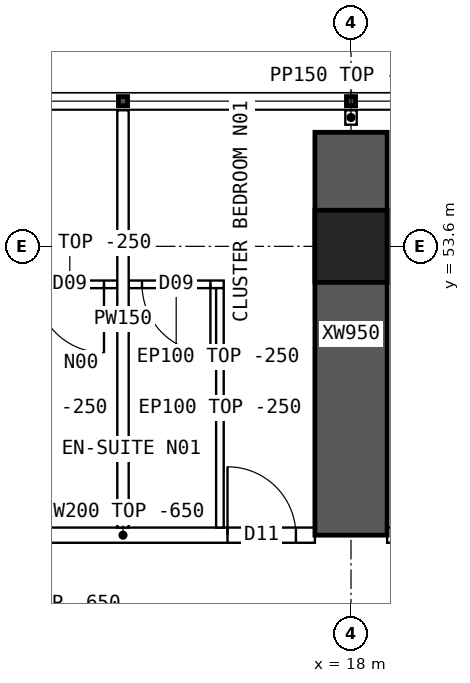
"""IFC4 building model, lengths in metres.
Left out: names, types, materials, properties, quantities, classifications, styles, units other than length and angle.
Written with IfcOpenShell. Run it as: python <this file> out.ifc"""

import sys

from ifc_helpers import new_model, si_unit, direction, frame, frame_2d, origin, origin_2d, place, context, subcontext, project, spatial, polyline, rectangle, hollow_rectangle, outline, extrude, element, fill, save


model = new_model("IFC4")
c1 = context("Model", 3, precision=1e-05, world=origin(), true_north=direction((0.0, 1.0)))
c2 = subcontext(c1, "Body", "Model", "MODEL_VIEW")
j1 = project(units=[si_unit("LENGTHUNIT", "METRE"), si_unit("PLANEANGLEUNIT", "RADIAN")], contexts=[c1])
p1 = place(None, origin())
s1 = spatial("IfcSite", under=j1, at=p1, CompositionType="ELEMENT")
p2 = place(p1, origin())
s2 = spatial("IfcBuilding", under=s1, at=p2, CompositionType="ELEMENT")
p3 = place(p2, frame((0.0, 0.0, 118.15)))
s3 = spatial("IfcBuildingStorey", under=s2, at=p3, CompositionType="ELEMENT", Elevation=118.15)
p4 = place(p3, frame((18.0, 53.6, 0.0), z_axis=(0.0, 0.0, 1.0), x_axis=(1.0, 0.0, 0.0)))
e1 = element("IfcColumn", 1, at=p4, inside=s3, PredefinedType="COLUMN", context=c2, shape_type="SweptSolid", body=[
    extrude(hollow_rectangle(XDim=0.95, YDim=0.95, WallThickness=0.095, at=origin_2d()), origin(), (0.0, 0.0, 1.0), 3.75),
])
p5 = place(p3, frame((18.0, 49.8, 0.0), z_axis=(0.0, 0.0, 1.0), x_axis=(0.0, 1.0, 0.0)))
e2 = element("IfcWall", 2, at=p5, inside=s3, PredefinedType="SHEAR", context=c2, shape_type="SweptSolid", body=[
    extrude(rectangle(XDim=5.3, YDim=0.95, at=frame_2d((2.65, 0.0))), origin(), (0.0, 0.0, 1.0), 3.75),
])
p6 = place(p3, frame((12.475, 49.8, 0.0), z_axis=(0.0, 0.0, 1.0), x_axis=(1.0, 0.0, 0.0)))
e3 = element("IfcWall", 3, at=p6, inside=s3, PredefinedType="SOLIDWALL", context=c2, shape_type="SweptSolid", body=[
    extrude(outline(polyline([(0.0, 0.0), (5.05, 0.0), (5.05, 3.1), (0.0, 3.1), (0.0, 0.0)])), frame((0.0, 0.1, 0.0), z_axis=(0.0, -1.0, 0.0), x_axis=(1.0, 0.0, 0.0)), (0.0, 0.0, 1.0), 0.2),
])
p7 = place(p6, frame((0.1, 0.0, 0.0)))
e4 = element("IfcOpeningElement", 4, at=p7, cuts=e3, PredefinedType="OPENING", context=c2, shape_type="SweptSolid", body=[
    extrude(rectangle(XDim=0.9, YDim=2.1, at=frame_2d((0.45, 1.05))), frame((0.0, 0.11, 0.0), z_axis=(0.0, -1.0, 0.0), x_axis=(1.0, 0.0, 0.0)), (0.0, 0.0, 1.0), 0.22),
])
p8 = place(p6, frame((3.9, 0.0, 0.0)))
e5 = element("IfcOpeningElement", 5, at=p8, cuts=e3, PredefinedType="OPENING", context=c2, shape_type="SweptSolid", body=[
    extrude(rectangle(XDim=0.9, YDim=2.1, at=frame_2d((0.45, 1.05))), frame((0.0, 0.11, 0.0), z_axis=(0.0, -1.0, 0.0), x_axis=(1.0, 0.0, 0.0)), (0.0, 0.0, 1.0), 0.22),
])
p9 = place(p3, frame((18.475, 49.8, 0.0), z_axis=(0.0, 0.0, 1.0), x_axis=(1.0, 0.0, 0.0)))
e6 = element("IfcWall", 6, at=p9, inside=s3, PredefinedType="SOLIDWALL", context=c2, shape_type="SweptSolid", body=[
    extrude(outline(polyline([(0.0, 0.0), (5.05, 0.0), (5.05, 3.1), (0.0, 3.1), (0.0, 0.0)])), frame((0.0, 0.1, 0.0), z_axis=(0.0, -1.0, 0.0), x_axis=(1.0, 0.0, 0.0)), (0.0, 0.0, 1.0), 0.2),
])
p10 = place(p9, frame((0.1, 0.0, 0.0)))
e7 = element("IfcOpeningElement", 7, at=p10, cuts=e6, PredefinedType="OPENING", context=c2, shape_type="SweptSolid", body=[
    extrude(rectangle(XDim=0.9, YDim=2.1, at=frame_2d((0.45, 1.05))), frame((0.0, 0.11, 0.0), z_axis=(0.0, -1.0, 0.0), x_axis=(1.0, 0.0, 0.0)), (0.0, 0.0, 1.0), 0.22),
])
p11 = place(p9, frame((3.9, 0.0, 0.0)))
e8 = element("IfcOpeningElement", 8, at=p11, cuts=e6, PredefinedType="OPENING", context=c2, shape_type="SweptSolid", body=[
    extrude(rectangle(XDim=0.9, YDim=2.1, at=frame_2d((0.45, 1.05))), frame((0.0, 0.11, 0.0), z_axis=(0.0, -1.0, 0.0), x_axis=(1.0, 0.0, 0.0)), (0.0, 0.0, 1.0), 0.22),
])
p12 = place(p3, frame((15.0, 55.39, 0.0), z_axis=(0.0, 0.0, 1.0), x_axis=(0.0, -1.0, 0.0)))
e9 = element("IfcWall", 9, at=p12, inside=s3, PredefinedType="PARTITIONING", context=c2, shape_type="SweptSolid", body=[
    extrude(outline(polyline([(0.0, 0.0), (5.49, 0.0), (5.49, 3.1), (5.442, 3.1), (5.44, 3.5), (1.992, 3.5), (1.99, 3.1), (1.592, 3.1), (1.59, 3.5), (0.0, 3.5), (0.0, 0.0)])), frame((0.0, 0.075, 0.0), z_axis=(0.0, -1.0, 0.0), x_axis=(1.0, 0.0, 0.0)), (0.0, 0.0, 1.0), 0.15),
])
p13 = place(p3, frame((13.675, 53.1, 0.0), z_axis=(0.0, 0.0, 1.0), x_axis=(1.0, 0.0, 0.0)))
e10 = element("IfcWall", 10, at=p13, inside=s3, PredefinedType="PARTITIONING", context=c2, shape_type="SweptSolid", body=[
    extrude(rectangle(XDim=1.25, YDim=0.1, at=frame_2d((0.625, 0.0))), origin(), (0.0, 0.0, 1.0), 3.5),
])
p14 = place(p13, frame((0.175, 0.0, 0.0)))
e11 = element("IfcOpeningElement", 11, at=p14, cuts=e10, PredefinedType="OPENING", context=c2, shape_type="SweptSolid", body=[
    extrude(rectangle(XDim=0.9, YDim=2.1, at=frame_2d((0.45, 1.05))), frame((0.0, 0.06, 0.0), z_axis=(0.0, -1.0, 0.0), x_axis=(1.0, 0.0, 0.0)), (0.0, 0.0, 1.0), 0.12),
])
p15 = place(p3, frame((15.075, 53.1, 0.0), z_axis=(0.0, 0.0, 1.0), x_axis=(1.0, 0.0, 0.0)))
e12 = element("IfcWall", 12, at=p15, inside=s3, PredefinedType="PARTITIONING", context=c2, shape_type="SweptSolid", body=[
    extrude(rectangle(XDim=1.25, YDim=0.1, at=frame_2d((0.625, 0.0))), origin(), (0.0, 0.0, 1.0), 3.5),
])
p16 = place(p15, frame((0.175, 0.0, 0.0)))
e13 = element("IfcOpeningElement", 13, at=p16, cuts=e12, PredefinedType="OPENING", context=c2, shape_type="SweptSolid", body=[
    extrude(rectangle(XDim=0.9, YDim=2.1, at=frame_2d((0.45, 1.05))), frame((0.0, 0.06, 0.0), z_axis=(0.0, -1.0, 0.0), x_axis=(1.0, 0.0, 0.0)), (0.0, 0.0, 1.0), 0.12),
])
p17 = place(p3, frame((16.275, 53.05, 0.0), z_axis=(0.0, 0.0, 1.0), x_axis=(0.0, -1.0, 0.0)))
e14 = element("IfcWall", 14, at=p17, inside=s3, PredefinedType="PARTITIONING", context=c2, shape_type="SweptSolid", body=[
    extrude(outline(polyline([(0.0, 0.0), (3.15, 0.0), (3.15, 3.1), (3.102, 3.1), (3.1, 3.5), (0.0, 3.5), (0.0, 0.0)])), frame((0.0, 0.05, 0.0), z_axis=(0.0, -1.0, 0.0), x_axis=(1.0, 0.0, 0.0)), (0.0, 0.0, 1.0), 0.1),
])
p18 = place(p3, frame((18.0, 55.2, 0.0), z_axis=(0.0, 0.0, 1.0), x_axis=(0.0, 1.0, 0.0)))
e15 = element("IfcWall", 15, at=p18, inside=s3, PredefinedType="PARTITIONING", context=c2, shape_type="SweptSolid", body=[
    extrude(rectangle(XDim=0.19, YDim=0.15, at=frame_2d((0.095, 0.0))), origin(), (0.0, 0.0, 1.0), 3.5),
])
p19 = place(p14, origin())
e16 = element("IfcDoor", 16, at=p19, inside=s3, OperationType="SINGLE_SWING_RIGHT", PredefinedType="DOOR", context=c2, shape_type="SweptSolid", body=[
    extrude(rectangle(XDim=0.9, YDim=2.1, at=frame_2d((0.45, 1.05))), frame((0.0, 0.025, 0.0), z_axis=(0.0, -1.0, 0.0), x_axis=(1.0, 0.0, 0.0)), (0.0, 0.0, 1.0), 0.05),
])
fill(e11, e16)
p20 = place(p16, origin())
e17 = element("IfcDoor", 17, at=p20, inside=s3, OperationType="SINGLE_SWING_RIGHT", PredefinedType="DOOR", context=c2, shape_type="SweptSolid", body=[
    extrude(rectangle(XDim=0.9, YDim=2.1, at=frame_2d((0.45, 1.05))), frame((0.0, 0.025, 0.0), z_axis=(0.0, -1.0, 0.0), x_axis=(1.0, 0.0, 0.0)), (0.0, 0.0, 1.0), 0.05),
])
fill(e13, e17)
p21 = place(p8, origin())
e18 = element("IfcDoor", 18, at=p21, inside=s3, OperationType="SINGLE_SWING_LEFT", PredefinedType="DOOR", context=c2, shape_type="SweptSolid", body=[
    extrude(rectangle(XDim=0.9, YDim=2.1, at=frame_2d((0.45, 1.05))), frame((0.0, 0.025, 0.0), z_axis=(0.0, -1.0, 0.0), x_axis=(1.0, 0.0, 0.0)), (0.0, 0.0, 1.0), 0.05),
])
fill(e5, e18)
save(model, sys.argv[1])
